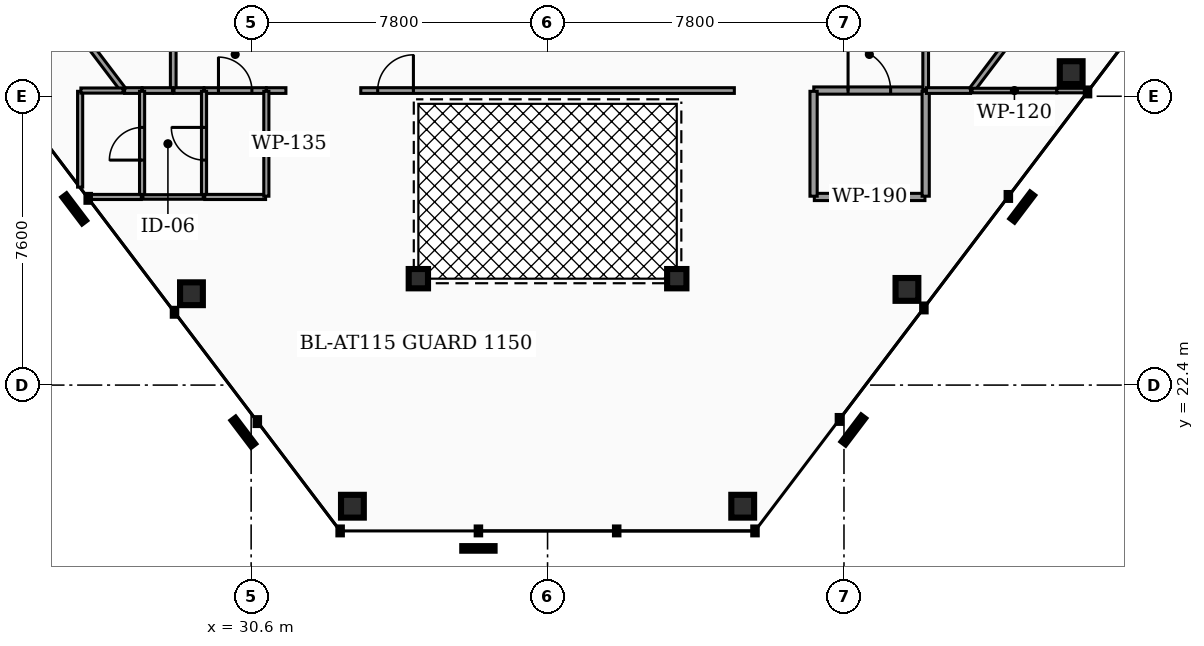
"""IFC4 building model, lengths in metres.
Left out: names, types, materials, properties, quantities, classifications, styles, units other than length and angle.
Written with IfcOpenShell. Run it as: python <this file> out.ifc"""

import sys

from ifc_helpers import new_model, si_unit, direction, frame, frame_2d, origin, origin_2d, place, context, subcontext, project, spatial, rectangle, hollow_rectangle, hollow_circle, extrude, element, fill, save


model = new_model("IFC4")
c1 = context("Model", 3, precision=1e-05, world=origin(), true_north=direction((0.0, 1.0)))
c2 = subcontext(c1, "Body", "Model", "MODEL_VIEW")
j1 = project(units=[si_unit("LENGTHUNIT", "METRE"), si_unit("PLANEANGLEUNIT", "RADIAN")], contexts=[c1])
p1 = place(None, origin())
s1 = spatial("IfcSite", under=j1, at=p1, CompositionType="ELEMENT")
p2 = place(p1, origin())
s2 = spatial("IfcBuilding", under=s1, at=p2, CompositionType="ELEMENT")
p3 = place(p2, frame((0.0, 0.0, 242.76)))
s3 = spatial("IfcBuildingStorey", under=s2, at=p3, CompositionType="ELEMENT", Elevation=242.76)
for number, where, z_axis, x_axis in (
    (1, (29.029, 24.803, 0.0), (0.0, 0.0, 1.0), (1.0, 0.0, 0.0)),
    (2, (33.265, 19.213, 0.0), (0.0, 0.0, 1.0), (1.0, 0.0, 0.0)),
    (3, (43.535, 19.213, 0.0), (0.0, 0.0, 1.0), (1.0, 0.0, 0.0)),
    (4, (47.857, 24.917, 0.0), (0.0, 0.0, 1.0), (1.0, 0.0, 0.0)),
    (5, (52.178, 30.622, 0.0), (0.0, 0.0, 1.0), (1.0, 0.0, 0.0)),
):
    element("IfcColumn", number, at=place(p3, frame(where, z_axis=z_axis, x_axis=x_axis)), inside=s3, PredefinedType="COLUMN", context=c2, shape_type="SweptSolid", body=[
        extrude(hollow_rectangle(XDim=0.6, YDim=0.6, WallThickness=0.03, at=origin_2d()), origin(), (0.0, 0.0, 1.0), 3.18),
    ])
for number, where, z_axis, x_axis in (
    (6, (35.0, 25.2, 0.0), (0.0, 0.0, 1.0), (1.0, 0.0, 0.0)),
    (7, (41.8, 25.2, 0.0), (0.0, 0.0, 1.0), (1.0, 0.0, 0.0)),
):
    element("IfcColumn", number, at=place(p3, frame(where, z_axis=z_axis, x_axis=x_axis)), inside=s3, PredefinedType="COLUMN", context=c2, shape_type="SweptSolid", body=[
        extrude(hollow_circle(Radius=0.254, WallThickness=0.02, at=origin_2d()), origin(), (0.0, 0.0, 1.0), 3.18),
    ])
p4 = place(p3, frame((45.405, 30.15, 0.0), z_axis=(0.0, 0.0, 1.0), x_axis=(1.0, 0.0, 0.0)))
e8 = element("IfcWall", 8, at=p4, inside=s3, PredefinedType="PARTITIONING", context=c2, shape_type="SweptSolid", body=[
    extrude(rectangle(XDim=2.925, YDim=0.19, at=frame_2d((1.462, 0.0))), origin(), (0.0, 0.0, 1.0), 2.235),
])
p5 = place(p4, frame((0.903, 0.0, 0.0)))
e9 = element("IfcOpeningElement", 9, at=p5, cuts=e8, PredefinedType="OPENING", context=c2, shape_type="SweptSolid", body=[
    extrude(rectangle(XDim=1.12, YDim=2.05, at=frame_2d((0.56, 1.025))), frame((0.0, 0.105, 0.0), z_axis=(0.0, -1.0, 0.0), x_axis=(1.0, 0.0, 0.0)), (0.0, 0.0, 1.0), 0.21),
])
p6 = place(p3, frame((28.55, 30.17, 0.0), z_axis=(0.0, 0.0, 1.0), x_axis=(0.0, 1.0, 0.0)))
e10 = element("IfcWall", 10, at=p6, inside=s3, PredefinedType="PARTITIONING", context=c2, shape_type="SweptSolid", body=[
    extrude(rectangle(XDim=3.06, YDim=0.15, at=frame_2d((1.53, 0.0))), origin(), (0.0, 0.0, 1.0), 2.235),
])
p7 = place(p6, frame((1.06, 0.0, 0.0)))
e11 = element("IfcOpeningElement", 11, at=p7, cuts=e10, PredefinedType="OPENING", context=c2, shape_type="SweptSolid", body=[
    extrude(rectangle(XDim=0.94, YDim=2.05, at=frame_2d((0.47, 1.025))), frame((0.0, 0.085, 0.0), z_axis=(0.0, -1.0, 0.0), x_axis=(1.0, 0.0, 0.0)), (0.0, 0.0, 1.0), 0.17),
])
p8 = place(p3, frame((48.35, 30.17, 0.0), z_axis=(0.0, 0.0, 1.0), x_axis=(0.0, 1.0, 0.0)))
e12 = element("IfcWall", 12, at=p8, inside=s3, PredefinedType="PARTITIONING", context=c2, shape_type="SweptSolid", body=[
    extrude(rectangle(XDim=3.06, YDim=0.15, at=frame_2d((1.53, 0.0))), origin(), (0.0, 0.0, 1.0), 2.235),
])
p9 = place(p3, frame((29.365, 30.15, 0.0), z_axis=(0.0, 0.0, 1.0), x_axis=(1.0, 0.0, 0.0)))
e13 = element("IfcWall", 13, at=p9, inside=s3, PredefinedType="PARTITIONING", context=c2, shape_type="SweptSolid", body=[
    extrude(rectangle(XDim=1.63, YDim=0.15, at=frame_2d((0.815, 0.0))), origin(), (0.0, 0.0, 1.0), 2.235),
])
p10 = place(p9, frame((0.375, 0.0, 0.0)))
e14 = element("IfcOpeningElement", 14, at=p10, cuts=e13, PredefinedType="OPENING", context=c2, shape_type="SweptSolid", body=[
    extrude(rectangle(XDim=0.88, YDim=2.05, at=frame_2d((0.44, 1.025))), frame((0.0, 0.085, 0.0), z_axis=(0.0, -1.0, 0.0), x_axis=(1.0, 0.0, 0.0)), (0.0, 0.0, 1.0), 0.17),
])
p11 = place(p3, frame((28.57, 30.15, 0.0), z_axis=(0.0, 0.0, 1.0), x_axis=(1.0, 0.0, 0.0)))
e15 = element("IfcWall", 15, at=p11, inside=s3, PredefinedType="PARTITIONING", context=c2, shape_type="SweptSolid", body=[
    extrude(rectangle(XDim=0.785, YDim=0.15, at=frame_2d((0.393, 0.0))), origin(), (0.0, 0.0, 1.0), 2.235),
])
p12 = place(p3, frame((33.485, 30.15, 0.0), z_axis=(0.0, 0.0, 1.0), x_axis=(1.0, 0.0, 0.0)))
e16 = element("IfcWall", 16, at=p12, inside=s3, PredefinedType="PARTITIONING", context=c2, shape_type="SweptSolid", body=[
    extrude(rectangle(XDim=9.83, YDim=0.15, at=frame_2d((4.915, 0.0))), origin(), (0.0, 0.0, 1.0), 2.235),
])
p13 = place(p12, frame((0.445, 0.0, 0.0)))
e17 = element("IfcOpeningElement", 17, at=p13, cuts=e16, PredefinedType="OPENING", context=c2, shape_type="SweptSolid", body=[
    extrude(rectangle(XDim=0.94, YDim=2.05, at=frame_2d((0.47, 1.025))), frame((0.0, 0.085, 0.0), z_axis=(0.0, -1.0, 0.0), x_axis=(1.0, 0.0, 0.0)), (0.0, 0.0, 1.0), 0.17),
])
p14 = place(p3, frame((31.005, 30.15, 0.0), z_axis=(0.0, 0.0, 1.0), x_axis=(1.0, 0.0, 0.0)))
e18 = element("IfcWall", 18, at=p14, inside=s3, PredefinedType="PARTITIONING", context=c2, shape_type="SweptSolid", body=[
    extrude(rectangle(XDim=0.51, YDim=0.15, at=frame_2d((0.255, 0.0))), origin(), (0.0, 0.0, 1.0), 2.235),
])
p15 = place(p3, frame((45.42, 27.35, 0.0), z_axis=(0.0, 0.0, 1.0), x_axis=(1.0, 0.0, 0.0)))
e19 = element("IfcWall", 19, at=p15, inside=s3, PredefinedType="PARTITIONING", context=c2, shape_type="SweptSolid", body=[
    extrude(rectangle(XDim=2.91, YDim=0.19, at=frame_2d((1.455, 0.0))), origin(), (0.0, 0.0, 1.0), 2.235),
])
for number, where, z_axis, x_axis in (
    (20, (45.4, 27.37, 0.0), (0.0, 0.0, 1.0), (0.0, 1.0, 0.0)),
    (21, (48.35, 27.37, 0.0), (0.0, 0.0, 1.0), (0.0, 1.0, 0.0)),
):
    element("IfcWall", number, at=place(p3, frame(where, z_axis=z_axis, x_axis=x_axis)), inside=s3, PredefinedType="PARTITIONING", context=c2, shape_type="SweptSolid", body=[
        extrude(rectangle(XDim=2.76, YDim=0.19, at=frame_2d((1.38, 0.0))), origin(), (0.0, 0.0, 1.0), 2.235),
    ])
p16 = place(p3, frame((27.27, 30.15, 0.0), z_axis=(0.0, 0.0, 1.0), x_axis=(1.0, 0.0, 0.0)))
e22 = element("IfcWall", 22, at=p16, inside=s3, PredefinedType="PARTITIONING", context=c2, shape_type="SweptSolid", body=[
    extrude(rectangle(XDim=0.455, YDim=0.15, at=frame_2d((0.228, 0.0))), origin(), (0.0, 0.0, 1.0), 2.235),
])
p17 = place(p3, frame((27.735, 30.15, 0.0), z_axis=(0.0, 0.0, 1.0), x_axis=(1.0, 0.0, 0.0)))
e23 = element("IfcWall", 23, at=p17, inside=s3, PredefinedType="PARTITIONING", context=c2, shape_type="SweptSolid", body=[
    extrude(rectangle(XDim=0.795, YDim=0.15, at=frame_2d((0.397, 0.0))), origin(), (0.0, 0.0, 1.0), 2.235),
])
p18 = place(p3, frame((48.37, 30.15, 0.0), z_axis=(0.0, 0.0, 1.0), x_axis=(1.0, 0.0, 0.0)))
e24 = element("IfcWall", 24, at=p18, inside=s3, PredefinedType="PARTITIONING", context=c2, shape_type="SweptSolid", body=[
    extrude(rectangle(XDim=1.16, YDim=0.15, at=frame_2d((0.58, 0.0))), origin(), (0.0, 0.0, 1.0), 2.235),
])
p19 = place(p3, frame((25.747, 32.134, 0.0), z_axis=(0.0, 0.0, 1.0), x_axis=(0.603931928578, -0.797035899847, 0.0)))
e25 = element("IfcWall", 25, at=p19, inside=s3, PredefinedType="PARTITIONING", context=c2, shape_type="SweptSolid", body=[
    extrude(rectangle(XDim=2.469, YDim=0.15, at=frame_2d((1.235, 0.0))), origin(), (0.0, 0.0, 1.0), 2.235),
])
p20 = place(p3, frame((49.562, 30.166, 0.0), z_axis=(0.0, 0.0, 1.0), x_axis=(0.603806281462, 0.797131089889, 0.0)))
e26 = element("IfcWall", 26, at=p20, inside=s3, PredefinedType="PARTITIONING", context=c2, shape_type="SweptSolid", body=[
    extrude(rectangle(XDim=2.469, YDim=0.15, at=frame_2d((1.234, 0.0))), origin(), (0.0, 0.0, 1.0), 2.235),
])
p21 = place(p3, frame((29.36, 27.37, 0.0), z_axis=(0.0, 0.0, 1.0), x_axis=(0.0, 1.0, 0.0)))
e27 = element("IfcWall", 27, at=p21, inside=s3, PredefinedType="PARTITIONING", context=c2, shape_type="SweptSolid", body=[
    extrude(rectangle(XDim=2.76, YDim=0.135, at=frame_2d((1.38, 0.0))), origin(), (0.0, 0.0, 1.0), 2.235),
])
p22 = place(p21, frame((0.95, 0.0, 0.0)))
e28 = element("IfcOpeningElement", 28, at=p22, cuts=e27, PredefinedType="OPENING", context=c2, shape_type="SweptSolid", body=[
    extrude(rectangle(XDim=0.86, YDim=2.05, at=frame_2d((0.43, 1.025))), frame((0.0, 0.077, 0.0), z_axis=(0.0, -1.0, 0.0), x_axis=(1.0, 0.0, 0.0)), (0.0, 0.0, 1.0), 0.155),
])
p23 = place(p3, frame((29.38, 27.35, 0.0), z_axis=(0.0, 0.0, 1.0), x_axis=(1.0, 0.0, 0.0)))
e29 = element("IfcWall", 29, at=p23, inside=s3, PredefinedType="PARTITIONING", context=c2, shape_type="SweptSolid", body=[
    extrude(rectangle(XDim=1.6, YDim=0.135, at=frame_2d((0.8, 0.0))), origin(), (0.0, 0.0, 1.0), 2.235),
])
p24 = place(p3, frame((31.0, 27.37, 0.0), z_axis=(0.0, 0.0, 1.0), x_axis=(0.0, 1.0, 0.0)))
e30 = element("IfcWall", 30, at=p24, inside=s3, PredefinedType="PARTITIONING", context=c2, shape_type="SweptSolid", body=[
    extrude(rectangle(XDim=2.76, YDim=0.135, at=frame_2d((1.38, 0.0))), origin(), (0.0, 0.0, 1.0), 2.235),
])
p25 = place(p3, frame((27.73, 27.37, 0.0), z_axis=(0.0, 0.0, 1.0), x_axis=(0.0, 1.0, 0.0)))
e31 = element("IfcWall", 31, at=p25, inside=s3, PredefinedType="PARTITIONING", context=c2, shape_type="SweptSolid", body=[
    extrude(rectangle(XDim=2.76, YDim=0.135, at=frame_2d((1.38, 0.0))), origin(), (0.0, 0.0, 1.0), 2.235),
])
p26 = place(p25, frame((0.95, 0.0, 0.0)))
e32 = element("IfcOpeningElement", 32, at=p26, cuts=e31, PredefinedType="OPENING", context=c2, shape_type="SweptSolid", body=[
    extrude(rectangle(XDim=0.86, YDim=2.05, at=frame_2d((0.43, 1.025))), frame((0.0, 0.077, 0.0), z_axis=(0.0, -1.0, 0.0), x_axis=(1.0, 0.0, 0.0)), (0.0, 0.0, 1.0), 0.155),
])
p27 = place(p3, frame((26.3, 27.35, 0.0), z_axis=(0.0, 0.0, 1.0), x_axis=(1.0, 0.0, 0.0)))
e33 = element("IfcWall", 33, at=p27, inside=s3, PredefinedType="PARTITIONING", context=c2, shape_type="SweptSolid", body=[
    extrude(rectangle(XDim=1.41, YDim=0.135, at=frame_2d((0.705, 0.0))), origin(), (0.0, 0.0, 1.0), 2.235),
])
p28 = place(p3, frame((26.1, 27.609, 0.0), z_axis=(0.0, 0.0, 1.0), x_axis=(0.0, 1.0, 0.0)))
e34 = element("IfcWall", 34, at=p28, inside=s3, PredefinedType="PARTITIONING", context=c2, shape_type="SweptSolid", body=[
    extrude(rectangle(XDim=2.521, YDim=0.135, at=frame_2d((1.26, 0.0))), origin(), (0.0, 0.0, 1.0), 2.235),
])
p29 = place(p3, frame((26.12, 30.15, 0.0), z_axis=(0.0, 0.0, 1.0), x_axis=(1.0, 0.0, 0.0)))
e35 = element("IfcWall", 35, at=p29, inside=s3, PredefinedType="PARTITIONING", context=c2, shape_type="SweptSolid", body=[
    extrude(rectangle(XDim=1.11, YDim=0.135, at=frame_2d((0.555, 0.0))), origin(), (0.0, 0.0, 1.0), 2.235),
])
p30 = place(p3, frame((27.75, 27.35, 0.0), z_axis=(0.0, 0.0, 1.0), x_axis=(1.0, 0.0, 0.0)))
e36 = element("IfcWall", 36, at=p30, inside=s3, PredefinedType="PARTITIONING", context=c2, shape_type="SweptSolid", body=[
    extrude(rectangle(XDim=1.59, YDim=0.12, at=frame_2d((0.795, 0.0))), origin(), (0.0, 0.0, 1.0), 2.235),
])
p31 = place(p3, frame((49.57, 30.15, 0.0), z_axis=(0.0, 0.0, 1.0), x_axis=(1.0, 0.0, 0.0)))
e37 = element("IfcWall", 37, at=p31, inside=s3, PredefinedType="PARTITIONING", context=c2, shape_type="SweptSolid", body=[
    extrude(rectangle(XDim=2.23, YDim=0.12, at=frame_2d((1.115, 0.0))), origin(), (0.0, 0.0, 1.0), 2.235),
])
p32 = place(p3, frame((51.8, 30.15, 0.0), z_axis=(0.0, 0.0, 1.0), x_axis=(1.0, 0.0, 0.0)))
e38 = element("IfcWall", 38, at=p32, inside=s3, PredefinedType="PARTITIONING", context=c2, shape_type="SweptSolid", body=[
    extrude(rectangle(XDim=0.822, YDim=0.12, at=frame_2d((0.411, 0.0))), origin(), (0.0, 0.0, 1.0), 2.235),
])
p33 = place(p5, origin())
e39 = element("IfcDoor", 39, at=p33, inside=s3, OperationType="SINGLE_SWING_LEFT", PredefinedType="DOOR", context=c2, shape_type="SweptSolid", body=[
    extrude(rectangle(XDim=1.12, YDim=2.05, at=frame_2d((0.56, 1.025))), frame((0.0, 0.025, 0.0), z_axis=(0.0, -1.0, 0.0), x_axis=(1.0, 0.0, 0.0)), (0.0, 0.0, 1.0), 0.05),
])
fill(e9, e39)
p34 = place(p10, origin())
e40 = element("IfcDoor", 40, at=p34, inside=s3, OperationType="SINGLE_SWING_LEFT", PredefinedType="DOOR", context=c2, shape_type="SweptSolid", body=[
    extrude(rectangle(XDim=0.88, YDim=2.05, at=frame_2d((0.44, 1.025))), frame((0.0, 0.025, 0.0), z_axis=(0.0, -1.0, 0.0), x_axis=(1.0, 0.0, 0.0)), (0.0, 0.0, 1.0), 0.05),
])
fill(e14, e40)
p35 = place(p13, origin())
e41 = element("IfcDoor", 41, at=p35, inside=s3, OperationType="SINGLE_SWING_RIGHT", PredefinedType="DOOR", context=c2, shape_type="SweptSolid", body=[
    extrude(rectangle(XDim=0.94, YDim=2.05, at=frame_2d((0.47, 1.025))), frame((0.0, 0.025, 0.0), z_axis=(0.0, -1.0, 0.0), x_axis=(1.0, 0.0, 0.0)), (0.0, 0.0, 1.0), 0.05),
])
fill(e17, e41)
p36 = place(p22, origin())
e42 = element("IfcDoor", 42, at=p36, inside=s3, OperationType="SINGLE_SWING_RIGHT", PredefinedType="DOOR", context=c2, shape_type="SweptSolid", body=[
    extrude(rectangle(XDim=0.86, YDim=2.05, at=frame_2d((0.43, 1.025))), frame((0.0, 0.025, 0.0), z_axis=(0.0, -1.0, 0.0), x_axis=(1.0, 0.0, 0.0)), (0.0, 0.0, 1.0), 0.05),
])
fill(e28, e42)
p37 = place(p26, origin())
e43 = element("IfcDoor", 43, at=p37, inside=s3, OperationType="SINGLE_SWING_LEFT", PredefinedType="DOOR", context=c2, shape_type="SweptSolid", body=[
    extrude(rectangle(XDim=0.86, YDim=2.05, at=frame_2d((0.43, 1.025))), frame((0.0, 0.025, 0.0), z_axis=(0.0, -1.0, 0.0), x_axis=(1.0, 0.0, 0.0)), (0.0, 0.0, 1.0), 0.05),
])
fill(e32, e43)
save(model, sys.argv[1])
